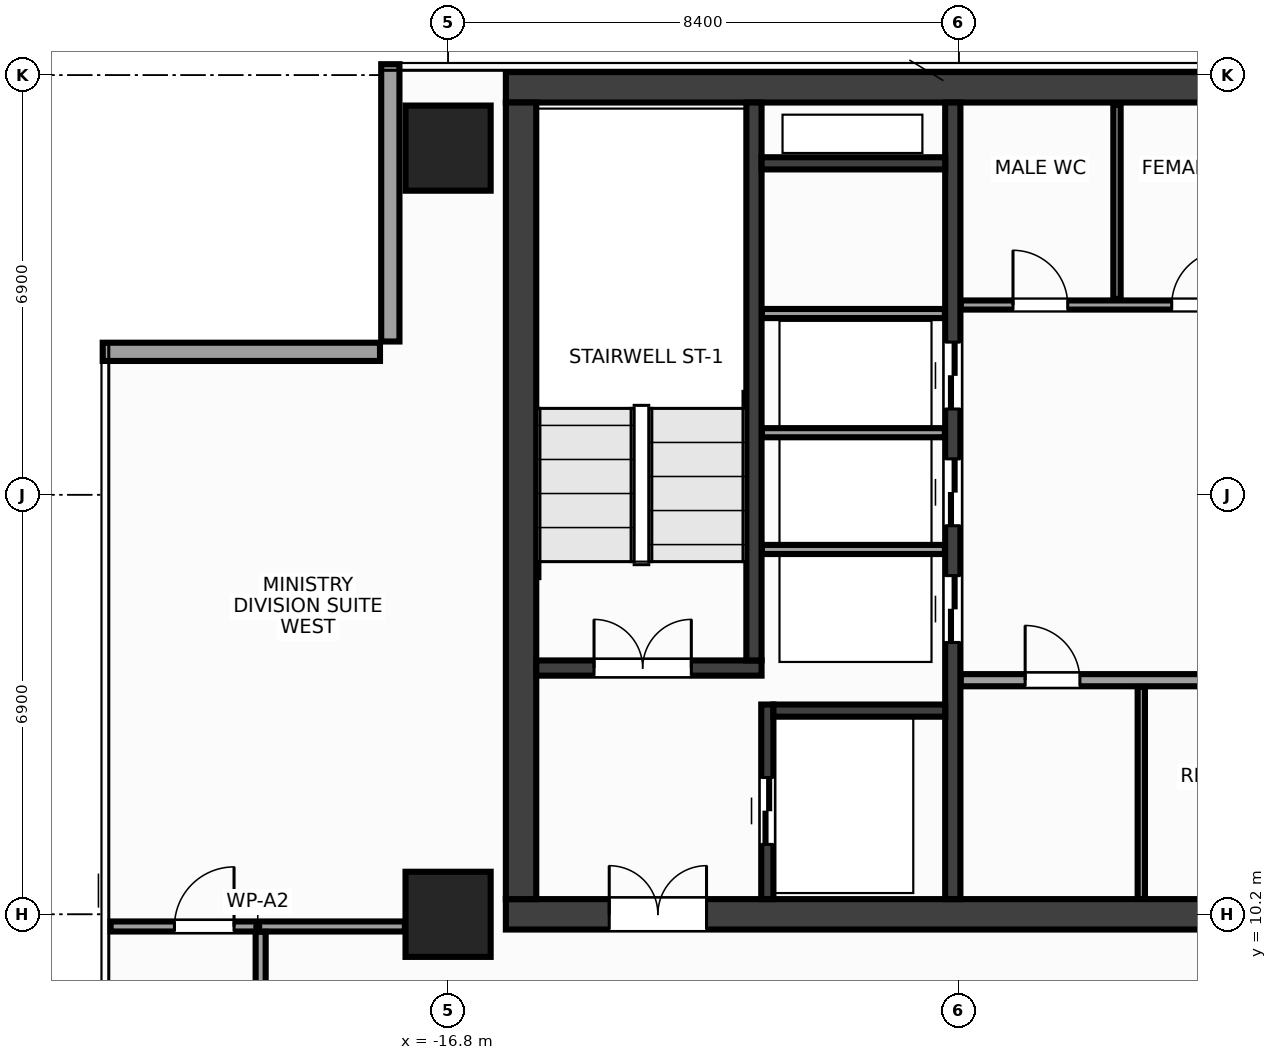
"""IFC4 building model, lengths in metres.
Left out: names, types, materials, properties, quantities, classifications, styles, units other than length and angle.
Written with IfcOpenShell. Run it as: python <this file> out.ifc"""

import sys

from ifc_helpers import new_model, si_unit, direction, frame, frame_2d, origin, origin_2d, place, context, subcontext, project, spatial, rectangle, extrude, source, transform, mapped, element, fill, save


model = new_model("IFC4")
c1 = context("Model", 3, precision=1e-05, world=origin(), true_north=direction((0.0, 1.0)))
c2 = subcontext(c1, "Body", "Model", "MODEL_VIEW")
j1 = project(units=[si_unit("LENGTHUNIT", "METRE"), si_unit("PLANEANGLEUNIT", "RADIAN")], contexts=[c1])
p1 = place(None, origin())
s1 = spatial("IfcSite", under=j1, at=p1, CompositionType="ELEMENT")
p2 = place(p1, origin())
s2 = spatial("IfcBuilding", under=s1, at=p2, CompositionType="ELEMENT")
p3 = place(p2, frame((0.0, 0.0, 257.6)))
s3 = spatial("IfcBuildingStorey", under=s2, at=p3, CompositionType="ELEMENT", Elevation=257.6)
m1 = source(origin(), c2, "Body", "SweptSolid", [
    extrude(rectangle(XDim=31.7, YDim=0.5, at=frame_2d((15.85, 0.0))), origin(), (0.0, 0.0, 1.0), 3.6),
])
p4 = place(p3, frame((-15.85, 23.8, 0.0), z_axis=(0.0, 0.0, 1.0), x_axis=(1.0, 0.0, 0.0)))
e1 = element("IfcWall", 1, at=p4, inside=s3, PredefinedType="SHEAR", context=c2, shape_type="MappedRepresentation", body=[
    mapped(m1, transform((0.0, 0.0, 0.0), x_axis=(1.0, 0.0, 0.0), y_axis=(0.0, 1.0, 0.0), z_axis=(0.0, 0.0, 1.0), scale=1.0)),
])
p5 = place(p3, frame((-15.85, 10.2, 0.0), z_axis=(0.0, 0.0, 1.0), x_axis=(1.0, 0.0, 0.0)))
e2 = element("IfcWall", 2, at=p5, inside=s3, PredefinedType="SHEAR", context=c2, shape_type="MappedRepresentation", body=[
    mapped(m1, transform((0.0, 0.0, 0.0), x_axis=(1.0, 0.0, 0.0), y_axis=(0.0, 1.0, 0.0), z_axis=(0.0, 0.0, 1.0), scale=1.0)),
])
p6 = place(p5, frame((1.7, 0.0, 0.0)))
e3 = element("IfcOpeningElement", 3, at=p6, cuts=e2, PredefinedType="OPENING", context=c2, shape_type="SweptSolid", body=[
    extrude(rectangle(XDim=1.6, YDim=2.15, at=frame_2d((0.8, 1.075))), frame((0.0, 0.262, 0.0), z_axis=(0.0, -1.0, 0.0), x_axis=(1.0, 0.0, 0.0)), (0.0, 0.0, 1.0), 0.524),
])
p7 = place(p5, frame((28.4, 0.0, 0.0)))
e4 = element("IfcOpeningElement", 4, at=p7, cuts=e2, PredefinedType="OPENING", context=c2, shape_type="SweptSolid", body=[
    extrude(rectangle(XDim=1.6, YDim=2.15, at=frame_2d((0.8, 1.075))), frame((0.0, 0.262, 0.0), z_axis=(0.0, -1.0, 0.0), x_axis=(1.0, 0.0, 0.0)), (0.0, 0.0, 1.0), 0.524),
])
p8 = place(p5, frame((15.1, 0.0, 0.0)))
e5 = element("IfcOpeningElement", 5, at=p8, cuts=e2, PredefinedType="OPENING", context=c2, shape_type="SweptSolid", body=[
    extrude(rectangle(XDim=1.5, YDim=2.2, at=frame_2d((0.75, 1.1))), frame((0.0, 0.262, 0.0), z_axis=(0.0, -1.0, 0.0), x_axis=(1.0, 0.0, 0.0)), (0.0, 0.0, 1.0), 0.524),
])
m2 = source(origin(), c2, "Body", "SweptSolid", [
    extrude(rectangle(XDim=13.1, YDim=0.5, at=frame_2d((6.55, 0.0))), origin(), (0.0, 0.0, 1.0), 3.6),
])
p9 = place(p3, frame((-15.6, 10.45, 0.0), z_axis=(0.0, 0.0, 1.0), x_axis=(0.0, 1.0, 0.0)))
e6 = element("IfcWall", 6, at=p9, inside=s3, PredefinedType="SHEAR", context=c2, shape_type="MappedRepresentation", body=[
    mapped(m2, transform((0.0, 0.0, 0.0), x_axis=(1.0, 0.0, 0.0), y_axis=(0.0, 1.0, 0.0), z_axis=(0.0, 0.0, 1.0), scale=1.0)),
])
m3 = source(origin(), c2, "Body", "SweptSolid", [
    extrude(rectangle(XDim=13.1, YDim=0.25, at=frame_2d((6.55, 0.0))), origin(), (0.0, 0.0, 1.0), 3.6),
])
p10 = place(p3, frame((-8.5, 10.45, 0.0), z_axis=(0.0, 0.0, 1.0), x_axis=(0.0, 1.0, 0.0)))
e7 = element("IfcWall", 7, at=p10, inside=s3, PredefinedType="SHEAR", context=c2, shape_type="MappedRepresentation", body=[
    mapped(m3, transform((0.0, 0.0, 0.0), x_axis=(1.0, 0.0, 0.0), y_axis=(0.0, 1.0, 0.0), z_axis=(0.0, 0.0, 1.0), scale=1.0)),
])
p11 = place(p10, frame((4.22, 0.0, 0.0)))
e8 = element("IfcOpeningElement", 8, at=p11, cuts=e7, PredefinedType="OPENING", context=c2, shape_type="SweptSolid", body=[
    extrude(rectangle(XDim=1.1, YDim=2.15, at=frame_2d((0.55, 1.075))), frame((0.0, 0.137, 0.0), z_axis=(0.0, -1.0, 0.0), x_axis=(1.0, 0.0, 0.0)), (0.0, 0.0, 1.0), 0.274),
])
p12 = place(p10, frame((6.14, 0.0, 0.0)))
e9 = element("IfcOpeningElement", 9, at=p12, cuts=e7, PredefinedType="OPENING", context=c2, shape_type="SweptSolid", body=[
    extrude(rectangle(XDim=1.1, YDim=2.15, at=frame_2d((0.55, 1.075))), frame((0.0, 0.137, 0.0), z_axis=(0.0, -1.0, 0.0), x_axis=(1.0, 0.0, 0.0)), (0.0, 0.0, 1.0), 0.274),
])
p13 = place(p10, frame((8.06, 0.0, 0.0)))
e10 = element("IfcOpeningElement", 10, at=p13, cuts=e7, PredefinedType="OPENING", context=c2, shape_type="SweptSolid", body=[
    extrude(rectangle(XDim=1.1, YDim=2.15, at=frame_2d((0.55, 1.075))), frame((0.0, 0.137, 0.0), z_axis=(0.0, -1.0, 0.0), x_axis=(1.0, 0.0, 0.0)), (0.0, 0.0, 1.0), 0.274),
])
m4 = source(origin(), c2, "Body", "SweptSolid", [
    extrude(rectangle(XDim=3.705, YDim=0.25, at=frame_2d((1.853, 0.0))), origin(), (0.0, 0.0, 1.0), 3.6),
])
p14 = place(p3, frame((-15.35, 14.25, 0.0), z_axis=(0.0, 0.0, 1.0), x_axis=(1.0, 0.0, 0.0)))
e11 = element("IfcWall", 11, at=p14, inside=s3, PredefinedType="SHEAR", context=c2, shape_type="MappedRepresentation", body=[
    mapped(m4, transform((0.0, 0.0, 0.0), x_axis=(1.0, 0.0, 0.0), y_axis=(0.0, 1.0, 0.0), z_axis=(0.0, 0.0, 1.0), scale=1.0)),
])
p15 = place(p14, frame((0.95, 0.0, 0.0)))
e12 = element("IfcOpeningElement", 12, at=p15, cuts=e11, PredefinedType="OPENING", context=c2, shape_type="SweptSolid", body=[
    extrude(rectangle(XDim=1.6, YDim=2.15, at=frame_2d((0.8, 1.075))), frame((0.0, 0.137, 0.0), z_axis=(0.0, -1.0, 0.0), x_axis=(1.0, 0.0, 0.0)), (0.0, 0.0, 1.0), 0.274),
])
m5 = source(origin(), c2, "Body", "SweptSolid", [
    extrude(rectangle(XDim=9.175, YDim=0.25, at=frame_2d((4.587, 0.0))), origin(), (0.0, 0.0, 1.0), 3.6),
])
p16 = place(p3, frame((-11.77, 14.375, 0.0), z_axis=(0.0, 0.0, 1.0), x_axis=(0.0, 1.0, 0.0)))
e13 = element("IfcWall", 13, at=p16, inside=s3, PredefinedType="SHEAR", context=c2, shape_type="MappedRepresentation", body=[
    mapped(m5, transform((0.0, 0.0, 0.0), x_axis=(1.0, 0.0, 0.0), y_axis=(0.0, 1.0, 0.0), z_axis=(0.0, 0.0, 1.0), scale=1.0)),
])
m6 = source(origin(), c2, "Body", "SweptSolid", [
    extrude(rectangle(XDim=3.2, YDim=0.2, at=frame_2d((1.6, 0.0))), origin(), (0.0, 0.0, 1.0), 3.6),
])
p17 = place(p3, frame((-11.55, 10.45, 0.0), z_axis=(0.0, 0.0, 1.0), x_axis=(0.0, 1.0, 0.0)))
e14 = element("IfcWall", 14, at=p17, inside=s3, PredefinedType="SHEAR", context=c2, shape_type="MappedRepresentation", body=[
    mapped(m6, transform((0.0, 0.0, 0.0), x_axis=(1.0, 0.0, 0.0), y_axis=(0.0, 1.0, 0.0), z_axis=(0.0, 0.0, 1.0), scale=1.0)),
])
p18 = place(p17, frame((0.9, 0.0, 0.0)))
e15 = element("IfcOpeningElement", 15, at=p18, cuts=e14, PredefinedType="OPENING", context=c2, shape_type="SweptSolid", body=[
    extrude(rectangle(XDim=1.1, YDim=2.15, at=frame_2d((0.55, 1.075))), frame((0.0, 0.112, 0.0), z_axis=(0.0, -1.0, 0.0), x_axis=(1.0, 0.0, 0.0)), (0.0, 0.0, 1.0), 0.224),
])
m7 = source(origin(), c2, "Body", "SweptSolid", [
    extrude(rectangle(XDim=2.825, YDim=0.2, at=frame_2d((1.413, 0.0))), origin(), (0.0, 0.0, 1.0), 3.6),
])
p19 = place(p3, frame((-11.45, 13.55, 0.0), z_axis=(0.0, 0.0, 1.0), x_axis=(1.0, 0.0, 0.0)))
e16 = element("IfcWall", 16, at=p19, inside=s3, PredefinedType="SHEAR", context=c2, shape_type="MappedRepresentation", body=[
    mapped(m7, transform((0.0, 0.0, 0.0), x_axis=(1.0, 0.0, 0.0), y_axis=(0.0, 1.0, 0.0), z_axis=(0.0, 0.0, 1.0), scale=1.0)),
])
m8 = source(origin(), c2, "Body", "SweptSolid", [
    extrude(rectangle(XDim=3.02, YDim=0.2, at=frame_2d((1.51, 0.0))), origin(), (0.0, 0.0, 1.0), 3.6),
])
p20 = place(p3, frame((-11.645, 22.55, 0.0), z_axis=(0.0, 0.0, 1.0), x_axis=(1.0, 0.0, 0.0)))
e17 = element("IfcWall", 17, at=p20, inside=s3, PredefinedType="SHEAR", context=c2, shape_type="MappedRepresentation", body=[
    mapped(m8, transform((0.0, 0.0, 0.0), x_axis=(1.0, 0.0, 0.0), y_axis=(0.0, 1.0, 0.0), z_axis=(0.0, 0.0, 1.0), scale=1.0)),
])
m9 = source(origin(), c2, "Body", "SweptSolid", [
    extrude(rectangle(XDim=1.4, YDim=1.4, at=origin_2d()), origin(), (0.0, 0.0, 1.0), 3.6),
])
for number, where, z_axis, x_axis in (
    (18, (-16.8, 10.2, 0.0), (0.0, 0.0, 1.0), (1.0, 0.0, 0.0)),
    (19, (-16.8, 22.8, 0.0), (0.0, 0.0, 1.0), (1.0, 0.0, 0.0)),
):
    element("IfcColumn", number, at=place(p3, frame(where, z_axis=z_axis, x_axis=x_axis)), inside=s3, PredefinedType="COLUMN", context=c2, shape_type="MappedRepresentation", body=[
        mapped(m9, transform((0.0, 0.0, 0.0), x_axis=(1.0, 0.0, 0.0), y_axis=(0.0, 1.0, 0.0), z_axis=(0.0, 0.0, 1.0), scale=1.0)),
    ])
m10 = source(origin(), c2, "Body", "SweptSolid", [
    extrude(rectangle(XDim=4.56, YDim=0.3, at=frame_2d((2.28, 0.0))), origin(), (0.0, 0.0, 1.0), 2.75),
])
p21 = place(p3, frame((-17.75, 24.18, 0.0), z_axis=(0.0, 0.0, 1.0), x_axis=(0.0, -1.0, 0.0)))
e20 = element("IfcWall", 20, at=p21, inside=s3, PredefinedType="STANDARD", context=c2, shape_type="MappedRepresentation", body=[
    mapped(m10, transform((0.0, 0.0, 0.0), x_axis=(1.0, 0.0, 0.0), y_axis=(0.0, 1.0, 0.0), z_axis=(0.0, 0.0, 1.0), scale=1.0)),
])
m11 = source(origin(), c2, "Body", "SweptSolid", [
    extrude(rectangle(XDim=4.56, YDim=0.3, at=frame_2d((2.28, 0.0))), origin(), (0.0, 0.0, 1.0), 2.75),
])
p22 = place(p3, frame((-17.92, 19.45, 0.0), z_axis=(0.0, 0.0, 1.0), x_axis=(-1.0, 0.0, 0.0)))
e21 = element("IfcWall", 21, at=p22, inside=s3, PredefinedType="STANDARD", context=c2, shape_type="MappedRepresentation", body=[
    mapped(m11, transform((0.0, 0.0, 0.0), x_axis=(1.0, 0.0, 0.0), y_axis=(0.0, 1.0, 0.0), z_axis=(0.0, 0.0, 1.0), scale=1.0)),
])
m12 = source(origin(), c2, "Body", "SweptSolid", [
    extrude(rectangle(XDim=3.01, YDim=0.15, at=frame_2d((1.505, 0.0))), origin(), (0.0, 0.0, 1.0), 3.37),
])
for number, where, z_axis, x_axis in (
    (22, (-11.64, 16.2, 0.0), (0.0, 0.0, 1.0), (1.0, 0.0, 0.0)),
    (23, (-11.64, 18.12, 0.0), (0.0, 0.0, 1.0), (1.0, 0.0, 0.0)),
    (24, (-11.64, 20.08, 0.0), (0.0, 0.0, 1.0), (1.0, 0.0, 0.0)),
):
    element("IfcWall", number, at=place(p3, frame(where, z_axis=z_axis, x_axis=x_axis)), inside=s3, PredefinedType="PARTITIONING", context=c2, shape_type="MappedRepresentation", body=[
        mapped(m12, transform((0.0, 0.0, 0.0), x_axis=(1.0, 0.0, 0.0), y_axis=(0.0, 1.0, 0.0), z_axis=(0.0, 0.0, 1.0), scale=1.0)),
    ])
m13 = source(origin(), c2, "Body", "SweptSolid", [
    extrude(rectangle(XDim=7.07, YDim=0.2, at=frame_2d((3.535, 0.0))), origin(), (0.0, 0.0, 1.0), 3.37),
])
p23 = place(p3, frame((-8.37, 14.05, 0.0), z_axis=(0.0, 0.0, 1.0), x_axis=(1.0, 0.0, 0.0)))
e25 = element("IfcWall", 25, at=p23, inside=s3, PredefinedType="PARTITIONING", context=c2, shape_type="MappedRepresentation", body=[
    mapped(m13, transform((0.0, 0.0, 0.0), x_axis=(1.0, 0.0, 0.0), y_axis=(0.0, 1.0, 0.0), z_axis=(0.0, 0.0, 1.0), scale=1.0)),
])
p24 = place(p23, frame((1.06, 0.0, 0.0)))
e26 = element("IfcOpeningElement", 26, at=p24, cuts=e25, PredefinedType="OPENING", context=c2, shape_type="SweptSolid", body=[
    extrude(rectangle(XDim=0.9, YDim=2.15, at=frame_2d((0.45, 1.075))), frame((0.0, 0.112, 0.0), z_axis=(0.0, -1.0, 0.0), x_axis=(1.0, 0.0, 0.0)), (0.0, 0.0, 1.0), 0.224),
])
p25 = place(p23, frame((4.51, 0.0, 0.0)))
e27 = element("IfcOpeningElement", 27, at=p25, cuts=e25, PredefinedType="OPENING", context=c2, shape_type="SweptSolid", body=[
    extrude(rectangle(XDim=0.9, YDim=2.15, at=frame_2d((0.45, 1.075))), frame((0.0, 0.112, 0.0), z_axis=(0.0, -1.0, 0.0), x_axis=(1.0, 0.0, 0.0)), (0.0, 0.0, 1.0), 0.224),
])
m14 = source(origin(), c2, "Body", "SweptSolid", [
    extrude(rectangle(XDim=14.59, YDim=0.15, at=frame_2d((7.295, 0.0))), origin(), (0.0, 0.0, 1.0), 3.37),
])
p26 = place(p3, frame((-8.37, 20.22, 0.0), z_axis=(0.0, 0.0, 1.0), x_axis=(1.0, 0.0, 0.0)))
e28 = element("IfcWall", 28, at=p26, inside=s3, PredefinedType="PARTITIONING", context=c2, shape_type="MappedRepresentation", body=[
    mapped(m14, transform((0.0, 0.0, 0.0), x_axis=(1.0, 0.0, 0.0), y_axis=(0.0, 1.0, 0.0), z_axis=(0.0, 0.0, 1.0), scale=1.0)),
])
p27 = place(p26, frame((0.86, 0.0, 0.0)))
e29 = element("IfcOpeningElement", 29, at=p27, cuts=e28, PredefinedType="OPENING", context=c2, shape_type="SweptSolid", body=[
    extrude(rectangle(XDim=0.9, YDim=2.15, at=frame_2d((0.45, 1.075))), frame((0.0, 0.087, 0.0), z_axis=(0.0, -1.0, 0.0), x_axis=(1.0, 0.0, 0.0)), (0.0, 0.0, 1.0), 0.174),
])
p28 = place(p26, frame((3.47, 0.0, 0.0)))
e30 = element("IfcOpeningElement", 30, at=p28, cuts=e28, PredefinedType="OPENING", context=c2, shape_type="SweptSolid", body=[
    extrude(rectangle(XDim=0.9, YDim=2.15, at=frame_2d((0.45, 1.075))), frame((0.0, 0.087, 0.0), z_axis=(0.0, -1.0, 0.0), x_axis=(1.0, 0.0, 0.0)), (0.0, 0.0, 1.0), 0.174),
])
p29 = place(p26, frame((6.17, 0.0, 0.0)))
e31 = element("IfcOpeningElement", 31, at=p29, cuts=e28, PredefinedType="OPENING", context=c2, shape_type="SweptSolid", body=[
    extrude(rectangle(XDim=0.9, YDim=2.15, at=frame_2d((0.45, 1.075))), frame((0.0, 0.087, 0.0), z_axis=(0.0, -1.0, 0.0), x_axis=(1.0, 0.0, 0.0)), (0.0, 0.0, 1.0), 0.174),
])
p30 = place(p26, frame((9.07, 0.0, 0.0)))
e32 = element("IfcOpeningElement", 32, at=p30, cuts=e28, PredefinedType="OPENING", context=c2, shape_type="SweptSolid", body=[
    extrude(rectangle(XDim=0.9, YDim=2.15, at=frame_2d((0.45, 1.075))), frame((0.0, 0.087, 0.0), z_axis=(0.0, -1.0, 0.0), x_axis=(1.0, 0.0, 0.0)), (0.0, 0.0, 1.0), 0.174),
])
p31 = place(p26, frame((12.32, 0.0, 0.0)))
e33 = element("IfcOpeningElement", 33, at=p31, cuts=e28, PredefinedType="OPENING", context=c2, shape_type="SweptSolid", body=[
    extrude(rectangle(XDim=0.9, YDim=2.15, at=frame_2d((0.45, 1.075))), frame((0.0, 0.087, 0.0), z_axis=(0.0, -1.0, 0.0), x_axis=(1.0, 0.0, 0.0)), (0.0, 0.0, 1.0), 0.174),
])
m15 = source(origin(), c2, "Body", "SweptSolid", [
    extrude(rectangle(XDim=3.49, YDim=0.12, at=frame_2d((1.745, 0.0))), origin(), (0.0, 0.0, 1.0), 3.37),
])
p32 = place(p3, frame((-5.4, 10.45, 0.0), z_axis=(0.0, 0.0, 1.0), x_axis=(0.0, 1.0, 0.0)))
e34 = element("IfcWall", 34, at=p32, inside=s3, PredefinedType="PARTITIONING", context=c2, shape_type="MappedRepresentation", body=[
    mapped(m15, transform((0.0, 0.0, 0.0), x_axis=(1.0, 0.0, 0.0), y_axis=(0.0, 1.0, 0.0), z_axis=(0.0, 0.0, 1.0), scale=1.0)),
])
m16 = source(origin(), c2, "Body", "SweptSolid", [
    extrude(rectangle(XDim=3.19, YDim=0.12, at=frame_2d((1.595, 0.0))), origin(), (0.0, 0.0, 1.0), 3.37),
])
p33 = place(p3, frame((-5.8, 20.32, 0.0), z_axis=(0.0, 0.0, 1.0), x_axis=(0.0, 1.0, 0.0)))
e35 = element("IfcWall", 35, at=p33, inside=s3, PredefinedType="PARTITIONING", context=c2, shape_type="MappedRepresentation", body=[
    mapped(m16, transform((0.0, 0.0, 0.0), x_axis=(1.0, 0.0, 0.0), y_axis=(0.0, 1.0, 0.0), z_axis=(0.0, 0.0, 1.0), scale=1.0)),
])
m17 = source(origin(), c2, "Body", "SweptSolid", [
    extrude(rectangle(XDim=4.84, YDim=0.165, at=frame_2d((2.42, 0.0))), origin(), (0.0, 0.0, 1.0), 3.37),
])
p34 = place(p3, frame((-22.35, 10.0, 0.0), z_axis=(0.0, 0.0, 1.0), x_axis=(1.0, 0.0, 0.0)))
e36 = element("IfcWall", 36, at=p34, inside=s3, PredefinedType="PARTITIONING", context=c2, shape_type="MappedRepresentation", body=[
    mapped(m17, transform((0.0, 0.0, 0.0), x_axis=(1.0, 0.0, 0.0), y_axis=(0.0, 1.0, 0.0), z_axis=(0.0, 0.0, 1.0), scale=1.0)),
])
p35 = place(p34, frame((1.05, 0.0, 0.0)))
e37 = element("IfcOpeningElement", 37, at=p35, cuts=e36, PredefinedType="OPENING", context=c2, shape_type="SweptSolid", body=[
    extrude(rectangle(XDim=0.98, YDim=2.15, at=frame_2d((0.49, 1.075))), frame((0.0, 0.094, 0.0), z_axis=(0.0, -1.0, 0.0), x_axis=(1.0, 0.0, 0.0)), (0.0, 0.0, 1.0), 0.189),
])
m18 = source(origin(), c2, "Body", "SweptSolid", [
    extrude(rectangle(XDim=2.108, YDim=0.165, at=frame_2d((1.054, 0.0))), origin(), (0.0, 0.0, 1.0), 3.37),
])
p36 = place(p3, frame((-19.883, 7.805, 0.0), z_axis=(0.0, 0.0, 1.0), x_axis=(0.0, 1.0, 0.0)))
e38 = element("IfcWall", 38, at=p36, inside=s3, PredefinedType="PARTITIONING", context=c2, shape_type="MappedRepresentation", body=[
    mapped(m18, transform((0.0, 0.0, 0.0), x_axis=(1.0, 0.0, 0.0), y_axis=(0.0, 1.0, 0.0), z_axis=(0.0, 0.0, 1.0), scale=1.0)),
])
m19 = source(origin(), c2, "Body", "SweptSolid", [
    extrude(rectangle(XDim=1.6, YDim=2.15, at=frame_2d((0.8, 1.075))), frame((0.0, 0.025, 0.0), z_axis=(0.0, -1.0, 0.0), x_axis=(1.0, 0.0, 0.0)), (0.0, 0.0, 1.0), 0.05),
])
p37 = place(p15, origin())
e39 = element("IfcDoor", 39, at=p37, inside=s3, OperationType="DOUBLE_DOOR_SINGLE_SWING", PredefinedType="DOOR", context=c2, shape_type="MappedRepresentation", body=[
    mapped(m19, transform((0.0, 0.0, 0.0), x_axis=(1.0, 0.0, 0.0), y_axis=(0.0, 1.0, 0.0), z_axis=(0.0, 0.0, 1.0), scale=1.0)),
])
fill(e12, e39)
p38 = place(p6, origin())
e40 = element("IfcDoor", 40, at=p38, inside=s3, OperationType="DOUBLE_DOOR_SINGLE_SWING", PredefinedType="DOOR", context=c2, shape_type="MappedRepresentation", body=[
    mapped(m19, transform((0.0, 0.0, 0.0), x_axis=(1.0, 0.0, 0.0), y_axis=(0.0, 1.0, 0.0), z_axis=(0.0, 0.0, 1.0), scale=1.0)),
])
fill(e3, e40)
m20 = source(origin(), c2, "Body", "SweptSolid", [
    extrude(rectangle(XDim=1.1, YDim=2.15, at=frame_2d((0.55, 1.075))), frame((0.0, 0.025, 0.0), z_axis=(0.0, -1.0, 0.0), x_axis=(1.0, 0.0, 0.0)), (0.0, 0.0, 1.0), 0.05),
])
p39 = place(p18, origin())
e41 = element("IfcDoor", 41, at=p39, inside=s3, OperationType="DOUBLE_DOOR_SLIDING", PredefinedType="DOOR", context=c2, shape_type="MappedRepresentation", body=[
    mapped(m20, transform((0.0, 0.0, 0.0), x_axis=(1.0, 0.0, 0.0), y_axis=(0.0, 1.0, 0.0), z_axis=(0.0, 0.0, 1.0), scale=1.0)),
])
fill(e15, e41)
p40 = place(p11, origin())
e42 = element("IfcDoor", 42, at=p40, inside=s3, OperationType="DOUBLE_DOOR_SLIDING", PredefinedType="DOOR", context=c2, shape_type="MappedRepresentation", body=[
    mapped(m20, transform((0.0, 0.0, 0.0), x_axis=(1.0, 0.0, 0.0), y_axis=(0.0, 1.0, 0.0), z_axis=(0.0, 0.0, 1.0), scale=1.0)),
])
fill(e8, e42)
p41 = place(p12, origin())
e43 = element("IfcDoor", 43, at=p41, inside=s3, OperationType="DOUBLE_DOOR_SLIDING", PredefinedType="DOOR", context=c2, shape_type="MappedRepresentation", body=[
    mapped(m20, transform((0.0, 0.0, 0.0), x_axis=(1.0, 0.0, 0.0), y_axis=(0.0, 1.0, 0.0), z_axis=(0.0, 0.0, 1.0), scale=1.0)),
])
fill(e9, e43)
p42 = place(p13, origin())
e44 = element("IfcDoor", 44, at=p42, inside=s3, OperationType="DOUBLE_DOOR_SLIDING", PredefinedType="DOOR", context=c2, shape_type="MappedRepresentation", body=[
    mapped(m20, transform((0.0, 0.0, 0.0), x_axis=(1.0, 0.0, 0.0), y_axis=(0.0, 1.0, 0.0), z_axis=(0.0, 0.0, 1.0), scale=1.0)),
])
fill(e10, e44)
m21 = source(origin(), c2, "Body", "SweptSolid", [
    extrude(rectangle(XDim=0.9, YDim=2.15, at=frame_2d((0.45, 1.075))), frame((0.0, 0.025, 0.0), z_axis=(0.0, -1.0, 0.0), x_axis=(1.0, 0.0, 0.0)), (0.0, 0.0, 1.0), 0.05),
])
p43 = place(p24, origin())
e45 = element("IfcDoor", 45, at=p43, inside=s3, OperationType="SINGLE_SWING_LEFT", PredefinedType="DOOR", context=c2, shape_type="MappedRepresentation", body=[
    mapped(m21, transform((0.0, 0.0, 0.0), x_axis=(1.0, 0.0, 0.0), y_axis=(0.0, 1.0, 0.0), z_axis=(0.0, 0.0, 1.0), scale=1.0)),
])
fill(e26, e45)
p44 = place(p27, origin())
e46 = element("IfcDoor", 46, at=p44, inside=s3, OperationType="SINGLE_SWING_LEFT", PredefinedType="DOOR", context=c2, shape_type="MappedRepresentation", body=[
    mapped(m21, transform((0.0, 0.0, 0.0), x_axis=(1.0, 0.0, 0.0), y_axis=(0.0, 1.0, 0.0), z_axis=(0.0, 0.0, 1.0), scale=1.0)),
])
fill(e29, e46)
p45 = place(p28, origin())
e47 = element("IfcDoor", 47, at=p45, inside=s3, OperationType="SINGLE_SWING_RIGHT", PredefinedType="DOOR", context=c2, shape_type="MappedRepresentation", body=[
    mapped(m21, transform((0.0, 0.0, 0.0), x_axis=(1.0, 0.0, 0.0), y_axis=(0.0, 1.0, 0.0), z_axis=(0.0, 0.0, 1.0), scale=1.0)),
])
fill(e30, e47)
m22 = source(origin(), c2, "Body", "SweptSolid", [
    extrude(rectangle(XDim=0.98, YDim=2.15, at=frame_2d((0.49, 1.075))), frame((0.0, 0.025, 0.0), z_axis=(0.0, -1.0, 0.0), x_axis=(1.0, 0.0, 0.0)), (0.0, 0.0, 1.0), 0.05),
])
p46 = place(p35, origin())
e48 = element("IfcDoor", 48, at=p46, inside=s3, OperationType="SINGLE_SWING_RIGHT", PredefinedType="DOOR", context=c2, shape_type="MappedRepresentation", body=[
    mapped(m22, transform((0.0, 0.0, 0.0), x_axis=(1.0, 0.0, 0.0), y_axis=(0.0, 1.0, 0.0), z_axis=(0.0, 0.0, 1.0), scale=1.0)),
])
fill(e37, e48)
save(model, sys.argv[1])
